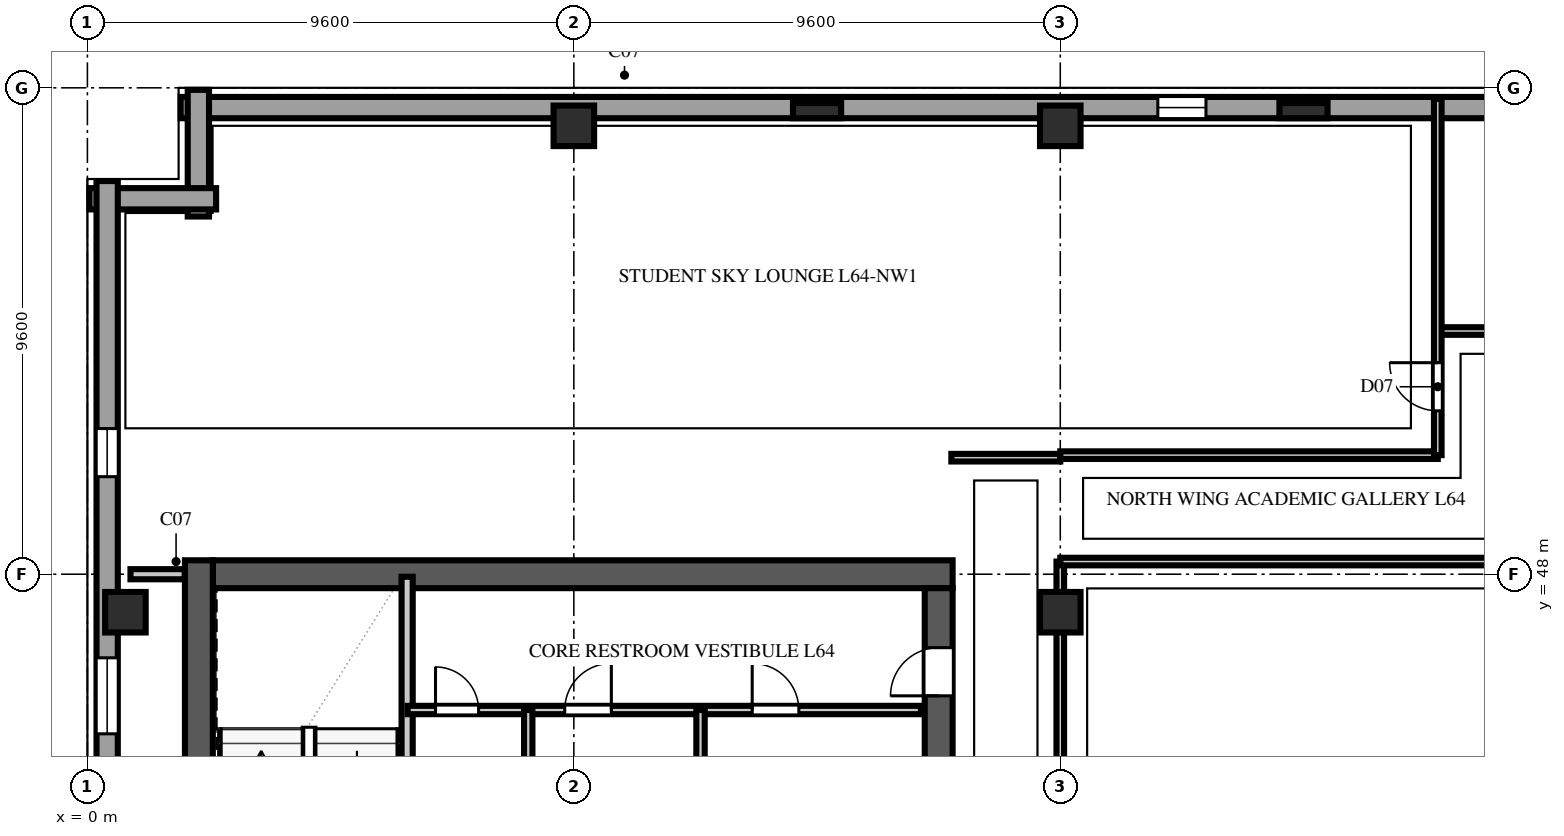
"""IFC4 building model, lengths in metres.
Left out: names, types, materials, properties, quantities, classifications, styles, units other than length and angle.
Written with IfcOpenShell. Run it as: python <this file> out.ifc"""

import sys

from ifc_helpers import new_model, si_unit, direction, frame, frame_2d, origin, origin_2d, place, context, subcontext, project, spatial, rectangle, extrude, element, fill, save


model = new_model("IFC4")
c1 = context("Model", 3, precision=1e-05, world=origin(), true_north=direction((0.0, 1.0)))
c2 = subcontext(c1, "Body", "Model", "MODEL_VIEW")
j1 = project(units=[si_unit("LENGTHUNIT", "METRE"), si_unit("PLANEANGLEUNIT", "RADIAN")], contexts=[c1])
p1 = place(None, origin())
s1 = spatial("IfcSite", under=j1, at=p1, CompositionType="ELEMENT")
p2 = place(p1, origin())
s2 = spatial("IfcBuilding", under=s1, at=p2, CompositionType="ELEMENT")
p3 = place(p2, frame((0.0, 0.0, 252.2)))
s3 = spatial("IfcBuildingStorey", under=s2, at=p3, CompositionType="ELEMENT", Elevation=252.2)
p4 = place(p3, frame((2.475, 48.0, 0.0), z_axis=(0.0, 0.0, 1.0), x_axis=(1.0, 0.0, 0.0)))
e1 = element("IfcWall", 1, at=p4, inside=s3, PredefinedType="SHEAR", context=c2, shape_type="SweptSolid", body=[
    extrude(rectangle(XDim=14.6, YDim=0.55, at=frame_2d((7.3, 0.0))), origin(), (0.0, 0.0, 1.0), 3.48),
])
p5 = place(p3, frame((2.2, 9.325, 0.0), z_axis=(0.0, 0.0, 1.0), x_axis=(0.0, 1.0, 0.0)))
e2 = element("IfcWall", 2, at=p5, inside=s3, PredefinedType="SHEAR", context=c2, shape_type="SweptSolid", body=[
    extrude(rectangle(XDim=38.95, YDim=0.55, at=frame_2d((19.475, 0.0))), origin(), (0.0, 0.0, 1.0), 3.48),
])
p6 = place(p3, frame((16.8, 36.4, 0.0), z_axis=(0.0, 0.0, 1.0), x_axis=(0.0, 1.0, 0.0)))
e3 = element("IfcWall", 3, at=p6, inside=s3, PredefinedType="SHEAR", context=c2, shape_type="SweptSolid", body=[
    extrude(rectangle(XDim=11.325, YDim=0.55, at=frame_2d((5.663, 0.0))), origin(), (0.0, 0.0, 1.0), 3.48),
])
p7 = place(p6, frame((9.2, 0.0, 0.0)))
e4 = element("IfcOpeningElement", 4, at=p7, cuts=e3, PredefinedType="OPENING", context=c2, shape_type="SweptSolid", body=[
    extrude(rectangle(XDim=0.95, YDim=2.15, at=frame_2d((0.475, 1.075))), frame((0.0, 0.287, 0.0), z_axis=(0.0, -1.0, 0.0), x_axis=(1.0, 0.0, 0.0)), (0.0, 0.0, 1.0), 0.574),
])
for number, where, z_axis, x_axis in (
    (5, (0.75, 47.25, 0.0), (0.0, 0.0, 1.0), (1.0, 0.0, 0.0)),
    (6, (9.6, 56.85, 0.0), (0.0, 0.0, 1.0), (1.0, 0.0, 0.0)),
    (7, (19.2, 47.25, 0.0), (0.0, 0.0, 1.0), (1.0, 0.0, 0.0)),
    (8, (19.2, 56.85, 0.0), (0.0, 0.0, 1.0), (1.0, 0.0, 0.0)),
):
    element("IfcColumn", number, at=place(p3, frame(where, z_axis=z_axis, x_axis=x_axis)), inside=s3, PredefinedType="COLUMN", context=c2, shape_type="SweptSolid", body=[
        extrude(rectangle(XDim=0.8, YDim=0.8, at=origin_2d()), origin(), (0.0, 0.0, 1.0), 3.8),
    ])
for number, where, z_axis, x_axis in (
    (9, (14.4, 57.15, 0.0), (0.0, 0.0, 1.0), (1.0, 0.0, 0.0)),
    (10, (24.0, 57.15, 0.0), (0.0, 0.0, 1.0), (1.0, 0.0, 0.0)),
):
    element("IfcColumn", number, at=place(p3, frame(where, z_axis=z_axis, x_axis=x_axis)), inside=s3, PredefinedType="PILASTER", context=c2, shape_type="SweptSolid", body=[
        extrude(rectangle(XDim=0.95, YDim=0.3, at=origin_2d()), origin(), (0.0, 0.0, 1.0), 3.8),
    ])
p8 = place(p3, frame((36.56, 57.21, 0.0), z_axis=(0.0, 0.0, 1.0), x_axis=(-1.0, 0.0, 0.0)))
e11 = element("IfcWall", 11, at=p8, inside=s3, PredefinedType="SOLIDWALL", context=c2, shape_type="SweptSolid", body=[
    extrude(rectangle(XDim=34.72, YDim=0.42, at=frame_2d((17.36, 0.0))), origin(), (0.0, 0.0, 1.0), 3.48),
])
p9 = place(p8, frame((4.885, 0.0, 0.85)))
e12 = element("IfcOpeningElement", 12, at=p9, cuts=e11, PredefinedType="OPENING", context=c2, shape_type="SweptSolid", body=[
    extrude(rectangle(XDim=0.95, YDim=1.85, at=frame_2d((0.475, 0.925))), frame((0.0, 0.222, 0.0), z_axis=(0.0, -1.0, 0.0), x_axis=(1.0, 0.0, 0.0)), (0.0, 0.0, 1.0), 0.444),
])
p10 = place(p8, frame((14.485, 0.0, 0.85)))
e13 = element("IfcOpeningElement", 13, at=p10, cuts=e11, PredefinedType="OPENING", context=c2, shape_type="SweptSolid", body=[
    extrude(rectangle(XDim=0.95, YDim=1.85, at=frame_2d((0.475, 0.925))), frame((0.0, 0.222, 0.0), z_axis=(0.0, -1.0, 0.0), x_axis=(1.0, 0.0, 0.0)), (0.0, 0.0, 1.0), 0.444),
])
for number, where, z_axis, x_axis in (
    (14, (2.19, 57.56, 0.0), (0.0, 0.0, 1.0), (0.0, -1.0, 0.0)),
    (15, (2.54, 55.41, 0.0), (0.0, 0.0, 1.0), (-1.0, 0.0, 0.0)),
):
    element("IfcWall", number, at=place(p3, frame(where, z_axis=z_axis, x_axis=x_axis)), inside=s3, PredefinedType="SOLIDWALL", context=c2, shape_type="SweptSolid", body=[
        extrude(rectangle(XDim=2.5, YDim=0.42, at=frame_2d((1.25, 0.0))), origin(), (0.0, 0.0, 1.0), 3.48),
    ])
p11 = place(p3, frame((0.39, 55.76, 0.0), z_axis=(0.0, 0.0, 1.0), x_axis=(0.0, -1.0, 0.0)))
e16 = element("IfcWall", 16, at=p11, inside=s3, PredefinedType="SOLIDWALL", context=c2, shape_type="SweptSolid", body=[
    extrude(rectangle(XDim=53.92, YDim=0.42, at=frame_2d((26.96, 0.0))), origin(), (0.0, 0.0, 1.0), 3.48),
])
p12 = place(p11, frame((4.885, 0.0, 0.85)))
e17 = element("IfcOpeningElement", 17, at=p12, cuts=e16, PredefinedType="OPENING", context=c2, shape_type="SweptSolid", body=[
    extrude(rectangle(XDim=0.95, YDim=1.85, at=frame_2d((0.475, 0.925))), frame((0.0, 0.222, 0.0), z_axis=(0.0, -1.0, 0.0), x_axis=(1.0, 0.0, 0.0)), (0.0, 0.0, 1.0), 0.444),
])
p13 = place(p11, frame((9.41, 0.0, 0.85)))
e18 = element("IfcOpeningElement", 18, at=p13, cuts=e16, PredefinedType="OPENING", context=c2, shape_type="SweptSolid", body=[
    extrude(rectangle(XDim=1.5, YDim=1.85, at=frame_2d((0.75, 0.925))), frame((0.0, 0.222, 0.0), z_axis=(0.0, -1.0, 0.0), x_axis=(1.0, 0.0, 0.0)), (0.0, 0.0, 1.0), 0.444),
])
p14 = place(p11, frame((14.485, 0.0, 0.85)))
e19 = element("IfcOpeningElement", 19, at=p14, cuts=e16, PredefinedType="OPENING", context=c2, shape_type="SweptSolid", body=[
    extrude(rectangle(XDim=0.95, YDim=1.85, at=frame_2d((0.475, 0.925))), frame((0.0, 0.222, 0.0), z_axis=(0.0, -1.0, 0.0), x_axis=(1.0, 0.0, 0.0)), (0.0, 0.0, 1.0), 0.444),
])
p15 = place(p11, frame((19.01, 0.0, 0.85)))
e20 = element("IfcOpeningElement", 20, at=p15, cuts=e16, PredefinedType="OPENING", context=c2, shape_type="SweptSolid", body=[
    extrude(rectangle(XDim=1.5, YDim=1.85, at=frame_2d((0.75, 0.925))), frame((0.0, 0.222, 0.0), z_axis=(0.0, -1.0, 0.0), x_axis=(1.0, 0.0, 0.0)), (0.0, 0.0, 1.0), 0.444),
])
p16 = place(p11, frame((24.085, 0.0, 0.85)))
e21 = element("IfcOpeningElement", 21, at=p16, cuts=e16, PredefinedType="OPENING", context=c2, shape_type="SweptSolid", body=[
    extrude(rectangle(XDim=0.95, YDim=1.85, at=frame_2d((0.475, 0.925))), frame((0.0, 0.222, 0.0), z_axis=(0.0, -1.0, 0.0), x_axis=(1.0, 0.0, 0.0)), (0.0, 0.0, 1.0), 0.444),
])
p17 = place(p11, frame((28.61, 0.0, 0.85)))
e22 = element("IfcOpeningElement", 22, at=p17, cuts=e16, PredefinedType="OPENING", context=c2, shape_type="SweptSolid", body=[
    extrude(rectangle(XDim=1.5, YDim=1.85, at=frame_2d((0.75, 0.925))), frame((0.0, 0.222, 0.0), z_axis=(0.0, -1.0, 0.0), x_axis=(1.0, 0.0, 0.0)), (0.0, 0.0, 1.0), 0.444),
])
p18 = place(p11, frame((33.685, 0.0, 0.85)))
e23 = element("IfcOpeningElement", 23, at=p18, cuts=e16, PredefinedType="OPENING", context=c2, shape_type="SweptSolid", body=[
    extrude(rectangle(XDim=0.95, YDim=1.85, at=frame_2d((0.475, 0.925))), frame((0.0, 0.222, 0.0), z_axis=(0.0, -1.0, 0.0), x_axis=(1.0, 0.0, 0.0)), (0.0, 0.0, 1.0), 0.444),
])
p19 = place(p11, frame((38.21, 0.0, 0.85)))
e24 = element("IfcOpeningElement", 24, at=p19, cuts=e16, PredefinedType="OPENING", context=c2, shape_type="SweptSolid", body=[
    extrude(rectangle(XDim=1.5, YDim=1.85, at=frame_2d((0.75, 0.925))), frame((0.0, 0.222, 0.0), z_axis=(0.0, -1.0, 0.0), x_axis=(1.0, 0.0, 0.0)), (0.0, 0.0, 1.0), 0.444),
])
p20 = place(p11, frame((43.285, 0.0, 0.85)))
e25 = element("IfcOpeningElement", 25, at=p20, cuts=e16, PredefinedType="OPENING", context=c2, shape_type="SweptSolid", body=[
    extrude(rectangle(XDim=0.95, YDim=1.85, at=frame_2d((0.475, 0.925))), frame((0.0, 0.222, 0.0), z_axis=(0.0, -1.0, 0.0), x_axis=(1.0, 0.0, 0.0)), (0.0, 0.0, 1.0), 0.444),
])
p21 = place(p11, frame((47.81, 0.0, 0.85)))
e26 = element("IfcOpeningElement", 26, at=p21, cuts=e16, PredefinedType="OPENING", context=c2, shape_type="SweptSolid", body=[
    extrude(rectangle(XDim=1.5, YDim=1.85, at=frame_2d((0.75, 0.925))), frame((0.0, 0.222, 0.0), z_axis=(0.0, -1.0, 0.0), x_axis=(1.0, 0.0, 0.0)), (0.0, 0.0, 1.0), 0.444),
])
p22 = place(p3, frame((6.31, 40.14, 0.0), z_axis=(0.0, 0.0, 1.0), x_axis=(0.0, 1.0, 0.0)))
e27 = element("IfcWall", 27, at=p22, inside=s3, PredefinedType="SOLIDWALL", context=c2, shape_type="SweptSolid", body=[
    extrude(rectangle(XDim=7.81, YDim=0.22, at=frame_2d((3.905, 0.0))), origin(), (0.0, 0.0, 1.0), 3.48),
])
p23 = place(p3, frame((6.32, 45.32, 0.0), z_axis=(0.0, 0.0, 1.0), x_axis=(1.0, 0.0, 0.0)))
e28 = element("IfcWall", 28, at=p23, inside=s3, PredefinedType="PLUMBINGWALL", context=c2, shape_type="SweptSolid", body=[
    extrude(rectangle(XDim=10.13, YDim=0.165, at=frame_2d((5.065, 0.0))), origin(), (0.0, 0.0, 1.0), 3.48),
])
p24 = place(p23, frame((0.55, 0.0, 0.0)))
e29 = element("IfcOpeningElement", 29, at=p24, cuts=e28, PredefinedType="OPENING", context=c2, shape_type="SweptSolid", body=[
    extrude(rectangle(XDim=0.85, YDim=2.1, at=frame_2d((0.425, 1.05))), frame((0.0, 0.094, 0.0), z_axis=(0.0, -1.0, 0.0), x_axis=(1.0, 0.0, 0.0)), (0.0, 0.0, 1.0), 0.189),
])
p25 = place(p23, frame((3.1, 0.0, 0.0)))
e30 = element("IfcOpeningElement", 30, at=p25, cuts=e28, PredefinedType="OPENING", context=c2, shape_type="SweptSolid", body=[
    extrude(rectangle(XDim=0.92, YDim=2.15, at=frame_2d((0.46, 1.075))), frame((0.0, 0.094, 0.0), z_axis=(0.0, -1.0, 0.0), x_axis=(1.0, 0.0, 0.0)), (0.0, 0.0, 1.0), 0.189),
])
p26 = place(p23, frame((6.8, 0.0, 0.0)))
e31 = element("IfcOpeningElement", 31, at=p26, cuts=e28, PredefinedType="OPENING", context=c2, shape_type="SweptSolid", body=[
    extrude(rectangle(XDim=0.92, YDim=2.15, at=frame_2d((0.46, 1.075))), frame((0.0, 0.094, 0.0), z_axis=(0.0, -1.0, 0.0), x_axis=(1.0, 0.0, 0.0)), (0.0, 0.0, 1.0), 0.189),
])
for number, where, z_axis, x_axis in (
    (32, (8.7, 40.4, 0.0), (0.0, 0.0, 1.0), (0.0, 1.0, 0.0)),
    (33, (12.1, 40.4, 0.0), (0.0, 0.0, 1.0), (0.0, 1.0, 0.0)),
):
    element("IfcWall", number, at=place(p3, frame(where, z_axis=z_axis, x_axis=x_axis)), inside=s3, PredefinedType="PLUMBINGWALL", context=c2, shape_type="SweptSolid", body=[
        extrude(rectangle(XDim=4.92, YDim=0.165, at=frame_2d((2.46, 0.0))), origin(), (0.0, 0.0, 1.0), 3.48),
    ])
p27 = place(p3, frame((0.85, 48.0, 0.0), z_axis=(0.0, 0.0, 1.0), x_axis=(1.0, 0.0, 0.0)))
e34 = element("IfcWall", 34, at=p27, inside=s3, PredefinedType="SOLIDWALL", context=c2, shape_type="SweptSolid", body=[
    extrude(rectangle(XDim=1.07, YDim=0.2, at=frame_2d((0.535, 0.0))), origin(), (0.0, 0.0, 1.0), 3.48),
])
p28 = place(p3, frame((17.05, 50.3, 0.0), z_axis=(0.0, 0.0, 1.0), x_axis=(1.0, 0.0, 0.0)))
e35 = element("IfcWall", 35, at=p28, inside=s3, PredefinedType="PARTITIONING", context=c2, shape_type="SweptSolid", body=[
    extrude(rectangle(XDim=2.15, YDim=0.15, at=frame_2d((1.075, 0.0))), origin(), (0.0, 0.0, 1.0), 3.48),
])
p29 = place(p3, frame((19.2, 38.18, 0.0), z_axis=(0.0, 0.0, 1.0), x_axis=(0.0, 1.0, 0.0)))
e36 = element("IfcWall", 36, at=p29, inside=s3, PredefinedType="PARTITIONING", context=c2, shape_type="SweptSolid", body=[
    extrude(rectangle(XDim=10.07, YDim=0.15, at=frame_2d((5.035, 0.0))), origin(), (0.0, 0.0, 1.0), 2.863),
])
p30 = place(p29, frame((3.85, 0.0, 0.0)))
e37 = element("IfcOpeningElement", 37, at=p30, cuts=e36, PredefinedType="OPENING", context=c2, shape_type="SweptSolid", body=[
    extrude(rectangle(XDim=0.95, YDim=2.15, at=frame_2d((0.475, 1.075))), frame((0.0, 0.087, 0.0), z_axis=(0.0, -1.0, 0.0), x_axis=(1.0, 0.0, 0.0)), (0.0, 0.0, 1.0), 0.174),
])
p31 = place(p3, frame((19.2, 48.25, 0.0), z_axis=(0.0, 0.0, 1.0), x_axis=(1.0, 0.0, 0.0)))
e38 = element("IfcWall", 38, at=p31, inside=s3, PredefinedType="PARTITIONING", context=c2, shape_type="SweptSolid", body=[
    extrude(rectangle(XDim=9.6, YDim=0.15, at=frame_2d((4.8, 0.0))), origin(), (0.0, 0.0, 1.0), 3.48),
])
p32 = place(p3, frame((19.2, 50.35, 0.0), z_axis=(0.0, 0.0, 1.0), x_axis=(1.0, 0.0, 0.0)))
e39 = element("IfcWall", 39, at=p32, inside=s3, PredefinedType="PARTITIONING", context=c2, shape_type="SweptSolid", body=[
    extrude(rectangle(XDim=7.45, YDim=0.15, at=frame_2d((3.725, 0.0))), origin(), (0.0, 0.0, 1.0), 3.48),
])
p33 = place(p3, frame((26.65, 52.8, 0.0), z_axis=(0.0, 0.0, 1.0), x_axis=(1.0, 0.0, 0.0)))
e40 = element("IfcWall", 40, at=p33, inside=s3, PredefinedType="PARTITIONING", context=c2, shape_type="SweptSolid", body=[
    extrude(rectangle(XDim=2.15, YDim=0.15, at=frame_2d((1.075, 0.0))), origin(), (0.0, 0.0, 1.0), 3.48),
])
p34 = place(p3, frame((26.65, 50.35, 0.0), z_axis=(0.0, 0.0, 1.0), x_axis=(0.0, 1.0, 0.0)))
e41 = element("IfcWall", 41, at=p34, inside=s3, PredefinedType="PARTITIONING", context=c2, shape_type="SweptSolid", body=[
    extrude(rectangle(XDim=7.03, YDim=0.15, at=frame_2d((3.515, 0.0))), origin(), (0.0, 0.0, 1.0), 3.48),
])
p35 = place(p34, frame((0.875, 0.0, 0.0)))
e42 = element("IfcOpeningElement", 42, at=p35, cuts=e41, PredefinedType="OPENING", context=c2, shape_type="SweptSolid", body=[
    extrude(rectangle(XDim=0.95, YDim=2.15, at=frame_2d((0.475, 1.075))), frame((0.0, 0.087, 0.0), z_axis=(0.0, -1.0, 0.0), x_axis=(1.0, 0.0, 0.0)), (0.0, 0.0, 1.0), 0.174),
])
p36 = place(p10, origin())
e43 = element("IfcWindow", 43, at=p36, inside=s3, PartitioningType="SINGLE_PANEL", PredefinedType="WINDOW", context=c2, shape_type="SweptSolid", body=[
    extrude(rectangle(XDim=0.95, YDim=1.85, at=frame_2d((0.475, 0.925))), frame((0.0, 0.11, 0.0), z_axis=(0.0, -1.0, 0.0), x_axis=(1.0, 0.0, 0.0)), (0.0, 0.0, 1.0), 0.06),
])
fill(e13, e43)
p37 = place(p12, origin())
e44 = element("IfcWindow", 44, at=p37, inside=s3, PartitioningType="SINGLE_PANEL", PredefinedType="WINDOW", context=c2, shape_type="SweptSolid", body=[
    extrude(rectangle(XDim=0.95, YDim=1.85, at=frame_2d((0.475, 0.925))), frame((0.0, 0.11, 0.0), z_axis=(0.0, -1.0, 0.0), x_axis=(1.0, 0.0, 0.0)), (0.0, 0.0, 1.0), 0.06),
])
fill(e17, e44)
p38 = place(p13, origin())
e45 = element("IfcWindow", 45, at=p38, inside=s3, PartitioningType="DOUBLE_PANEL_VERTICAL", PredefinedType="WINDOW", context=c2, shape_type="SweptSolid", body=[
    extrude(rectangle(XDim=1.5, YDim=1.85, at=frame_2d((0.75, 0.925))), frame((0.0, 0.11, 0.0), z_axis=(0.0, -1.0, 0.0), x_axis=(1.0, 0.0, 0.0)), (0.0, 0.0, 1.0), 0.06),
])
fill(e18, e45)
p39 = place(p7, origin())
e46 = element("IfcDoor", 46, at=p39, inside=s3, OperationType="SINGLE_SWING_LEFT", PredefinedType="DOOR", context=c2, shape_type="SweptSolid", body=[
    extrude(rectangle(XDim=0.95, YDim=2.15, at=frame_2d((0.475, 1.075))), frame((0.0, 0.025, 0.0), z_axis=(0.0, -1.0, 0.0), x_axis=(1.0, 0.0, 0.0)), (0.0, 0.0, 1.0), 0.05),
])
fill(e4, e46)
p40 = place(p24, origin())
e47 = element("IfcDoor", 47, at=p40, inside=s3, OperationType="SINGLE_SWING_LEFT", PredefinedType="DOOR", context=c2, shape_type="SweptSolid", body=[
    extrude(rectangle(XDim=0.85, YDim=2.1, at=frame_2d((0.425, 1.05))), frame((0.0, 0.025, 0.0), z_axis=(0.0, -1.0, 0.0), x_axis=(1.0, 0.0, 0.0)), (0.0, 0.0, 1.0), 0.05),
])
fill(e29, e47)
p41 = place(p25, origin())
e48 = element("IfcDoor", 48, at=p41, inside=s3, OperationType="SINGLE_SWING_RIGHT", PredefinedType="DOOR", context=c2, shape_type="SweptSolid", body=[
    extrude(rectangle(XDim=0.92, YDim=2.15, at=frame_2d((0.46, 1.075))), frame((0.0, 0.025, 0.0), z_axis=(0.0, -1.0, 0.0), x_axis=(1.0, 0.0, 0.0)), (0.0, 0.0, 1.0), 0.05),
])
fill(e30, e48)
p42 = place(p26, origin())
e49 = element("IfcDoor", 49, at=p42, inside=s3, OperationType="SINGLE_SWING_LEFT", PredefinedType="DOOR", context=c2, shape_type="SweptSolid", body=[
    extrude(rectangle(XDim=0.92, YDim=2.15, at=frame_2d((0.46, 1.075))), frame((0.0, 0.025, 0.0), z_axis=(0.0, -1.0, 0.0), x_axis=(1.0, 0.0, 0.0)), (0.0, 0.0, 1.0), 0.05),
])
fill(e31, e49)
p43 = place(p35, origin())
e50 = element("IfcDoor", 50, at=p43, inside=s3, OperationType="SINGLE_SWING_RIGHT", PredefinedType="DOOR", context=c2, shape_type="SweptSolid", body=[
    extrude(rectangle(XDim=0.95, YDim=2.15, at=frame_2d((0.475, 1.075))), frame((0.0, 0.025, 0.0), z_axis=(0.0, -1.0, 0.0), x_axis=(1.0, 0.0, 0.0)), (0.0, 0.0, 1.0), 0.05),
])
fill(e42, e50)
save(model, sys.argv[1])
